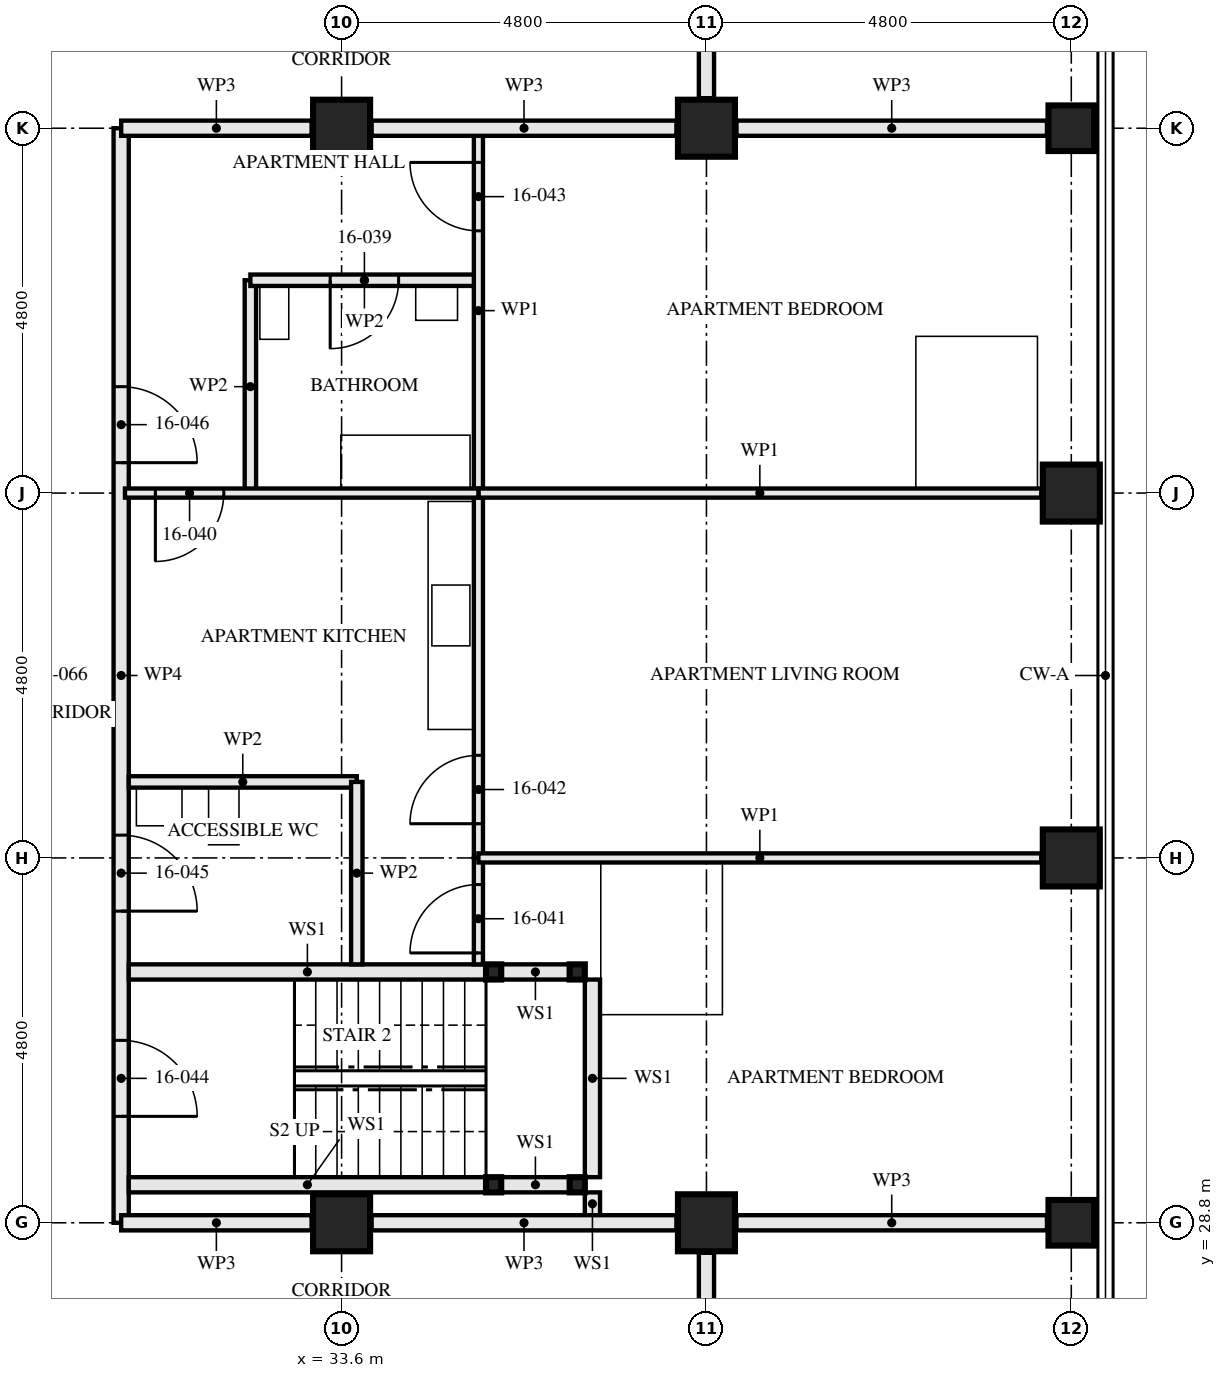
"""IFC4 building model, lengths in metres.
Left out: names, types, materials, properties, quantities, classifications, styles, units other than length and angle.
Written with IfcOpenShell. Run it as: python <this file> out.ifc"""

import sys

from ifc_helpers import new_model, si_unit, direction, frame, frame_2d, origin, origin_2d, place, context, subcontext, project, spatial, rectangle, hollow_rectangle, extrude, element, fill, save


model = new_model("IFC4")
c1 = context("Model", 3, precision=1e-05, world=origin(), true_north=direction((0.0, 1.0)))
c2 = subcontext(c1, "Body", "Model", "MODEL_VIEW")
j1 = project(units=[si_unit("LENGTHUNIT", "METRE"), si_unit("PLANEANGLEUNIT", "RADIAN")], contexts=[c1])
p1 = place(None, origin())
s1 = spatial("IfcSite", under=j1, at=p1, CompositionType="ELEMENT")
p2 = place(p1, origin())
s2 = spatial("IfcBuilding", under=s1, at=p2, CompositionType="ELEMENT")
p3 = place(p2, frame((0.0, 0.0, 62.0)))
s3 = spatial("IfcBuildingStorey", under=s2, at=p3, CompositionType="ELEMENT", Elevation=62.0)
for number, where, z_axis, x_axis in (
    (1, (33.6, 28.8, 0.0), (0.0, 0.0, 1.0), (0.0, 1.0, 0.0)),
    (2, (33.6, 43.2, 0.0), (0.0, 0.0, 1.0), (0.0, 1.0, 0.0)),
    (3, (38.4, 28.8, 0.0), (0.0, 0.0, 1.0), (0.0, 1.0, 0.0)),
    (4, (38.4, 43.2, 0.0), (0.0, 0.0, 1.0), (0.0, 1.0, 0.0)),
):
    element("IfcColumn", number, at=place(p3, frame(where, z_axis=z_axis, x_axis=x_axis)), inside=s3, PredefinedType="COLUMN", context=c2, shape_type="SweptSolid", body=[
        extrude(hollow_rectangle(XDim=0.75, YDim=0.75, WallThickness=0.08, at=origin_2d()), origin(), (0.0, 0.0, 1.0), 3.5),
    ])
p4 = place(p3, frame((43.2, 28.8, 0.0), z_axis=(0.0, 0.0, 1.0), x_axis=(0.0, 1.0, 0.0)))
e5 = element("IfcColumn", 5, at=p4, inside=s3, PredefinedType="COLUMN", context=c2, shape_type="SweptSolid", body=[
    extrude(hollow_rectangle(XDim=0.6, YDim=0.6, WallThickness=0.08, at=origin_2d()), origin(), (0.0, 0.0, 1.0), 3.5),
])
for number, where, z_axis, x_axis in (
    (6, (43.2, 33.6, 0.0), (0.0, 0.0, 1.0), (1.0, 0.0, 0.0)),
    (7, (43.2, 38.4, 0.0), (0.0, 0.0, 1.0), (1.0, 0.0, 0.0)),
):
    element("IfcColumn", number, at=place(p3, frame(where, z_axis=z_axis, x_axis=x_axis)), inside=s3, PredefinedType="COLUMN", context=c2, shape_type="SweptSolid", body=[
        extrude(hollow_rectangle(XDim=0.75, YDim=0.75, WallThickness=0.08, at=origin_2d()), origin(), (0.0, 0.0, 1.0), 3.5),
    ])
p5 = place(p3, frame((43.2, 43.2, 0.0), z_axis=(0.0, 0.0, 1.0), x_axis=(0.0, 1.0, 0.0)))
e8 = element("IfcColumn", 8, at=p5, inside=s3, PredefinedType="COLUMN", context=c2, shape_type="SweptSolid", body=[
    extrude(hollow_rectangle(XDim=0.6, YDim=0.6, WallThickness=0.08, at=origin_2d()), origin(), (0.0, 0.0, 1.0), 3.5),
])
for number, where, z_axis, x_axis in (
    (9, (36.7, 29.3, 0.0), (0.0, 0.0, 1.0), (1.0, 0.0, 0.0)),
    (10, (36.7, 32.1, 0.0), (0.0, 0.0, 1.0), (1.0, 0.0, 0.0)),
    (11, (35.6, 29.3, 0.0), (0.0, 0.0, 1.0), (1.0, 0.0, 0.0)),
    (12, (35.6, 32.1, 0.0), (0.0, 0.0, 1.0), (1.0, 0.0, 0.0)),
):
    element("IfcColumn", number, at=place(p3, frame(where, z_axis=z_axis, x_axis=x_axis)), inside=s3, PredefinedType="COLUMN", context=c2, shape_type="SweptSolid", body=[
        extrude(hollow_rectangle(XDim=0.2, YDim=0.2, WallThickness=0.008, at=origin_2d()), origin(), (0.0, 0.0, 1.0), 3.33),
    ])
p6 = place(p3, frame((38.4, 26.8, 0.0), z_axis=(0.0, 0.0, 1.0), x_axis=(0.0, 1.0, 0.0)))
e13 = element("IfcWall", 13, at=p6, inside=s3, PredefinedType="PARTITIONING", context=c2, shape_type="SweptSolid", body=[
    extrude(rectangle(XDim=1.605, YDim=0.2, at=frame_2d((0.802, 0.0))), origin(), (0.0, 0.0, 1.0), 3.33),
])
p7 = place(p3, frame((36.6, 29.3, 0.0), z_axis=(0.0, 0.0, 1.0), x_axis=(-1.0, 0.0, 0.0)))
e14 = element("IfcWall", 14, at=p7, inside=s3, PredefinedType="SOLIDWALL", context=c2, shape_type="SweptSolid", body=[
    extrude(rectangle(XDim=0.9, YDim=0.2, at=frame_2d((0.45, 0.0))), origin(), (0.0, 0.0, 1.0), 2.99),
])
p8 = place(p3, frame((35.5, 29.3, 0.0), z_axis=(0.0, 0.0, 1.0), x_axis=(-1.0, 0.0, 0.0)))
e15 = element("IfcWall", 15, at=p8, inside=s3, PredefinedType="SOLIDWALL", context=c2, shape_type="SweptSolid", body=[
    extrude(rectangle(XDim=4.7, YDim=0.2, at=frame_2d((2.35, 0.0))), origin(), (0.0, 0.0, 1.0), 2.99),
])
p9 = place(p3, frame((36.6, 32.1, 0.0), z_axis=(0.0, 0.0, 1.0), x_axis=(-1.0, 0.0, 0.0)))
e16 = element("IfcWall", 16, at=p9, inside=s3, PredefinedType="SOLIDWALL", context=c2, shape_type="SweptSolid", body=[
    extrude(rectangle(XDim=0.9, YDim=0.2, at=frame_2d((0.45, 0.0))), origin(), (0.0, 0.0, 1.0), 2.99),
])
p10 = place(p3, frame((35.5, 32.1, 0.0), z_axis=(0.0, 0.0, 1.0), x_axis=(-1.0, 0.0, 0.0)))
e17 = element("IfcWall", 17, at=p10, inside=s3, PredefinedType="SOLIDWALL", context=c2, shape_type="SweptSolid", body=[
    extrude(rectangle(XDim=4.7, YDim=0.2, at=frame_2d((2.35, 0.0))), origin(), (0.0, 0.0, 1.0), 2.99),
])
p11 = place(p3, frame((36.9, 28.9, 0.0), z_axis=(0.0, 0.0, 1.0), x_axis=(0.0, 1.0, 0.0)))
e18 = element("IfcWall", 18, at=p11, inside=s3, PredefinedType="SOLIDWALL", context=c2, shape_type="SweptSolid", body=[
    extrude(rectangle(XDim=0.3, YDim=0.2, at=frame_2d((0.15, 0.0))), origin(), (0.0, 0.0, 1.0), 3.33),
])
p12 = place(p3, frame((36.9, 29.4, 0.0), z_axis=(0.0, 0.0, 1.0), x_axis=(0.0, 1.0, 0.0)))
e19 = element("IfcWall", 19, at=p12, inside=s3, PredefinedType="SOLIDWALL", context=c2, shape_type="SweptSolid", body=[
    extrude(rectangle(XDim=2.6, YDim=0.2, at=frame_2d((1.3, 0.0))), origin(), (0.0, 0.0, 1.0), 3.33),
])
p13 = place(p3, frame((33.8, 32.2, 0.0), z_axis=(0.0, 0.0, 1.0), x_axis=(0.0, 1.0, 0.0)))
e20 = element("IfcWall", 20, at=p13, inside=s3, PredefinedType="PARTITIONING", context=c2, shape_type="SweptSolid", body=[
    extrude(rectangle(XDim=2.4, YDim=0.15, at=frame_2d((1.2, 0.0))), origin(), (0.0, 0.0, 1.0), 2.55),
])
p14 = place(p3, frame((33.8, 34.6, 0.0), z_axis=(0.0, 0.0, 1.0), x_axis=(-1.0, 0.0, 0.0)))
e21 = element("IfcWall", 21, at=p14, inside=s3, PredefinedType="PARTITIONING", context=c2, shape_type="SweptSolid", body=[
    extrude(rectangle(XDim=3.0, YDim=0.15, at=frame_2d((1.5, 0.0))), origin(), (0.0, 0.0, 1.0), 3.33),
])
p15 = place(p3, frame((35.4, 41.2, 0.0), z_axis=(0.0, 0.0, 1.0), x_axis=(-1.0, 0.0, 0.0)))
e22 = element("IfcWall", 22, at=p15, inside=s3, PredefinedType="PARTITIONING", context=c2, shape_type="SweptSolid", body=[
    extrude(rectangle(XDim=3.0, YDim=0.15, at=frame_2d((1.5, 0.0))), origin(), (0.0, 0.0, 1.0), 3.33),
])
p16 = place(p15, frame((1.05, 0.0, 0.0)))
e23 = element("IfcOpeningElement", 23, at=p16, cuts=e22, PredefinedType="OPENING", context=c2, shape_type="SweptSolid", body=[
    extrude(rectangle(XDim=0.9, YDim=2.1, at=frame_2d((0.45, 1.05))), frame((0.0, 0.085, 0.0), z_axis=(0.0, -1.0, 0.0), x_axis=(1.0, 0.0, 0.0)), (0.0, 0.0, 1.0), 0.171),
])
p17 = place(p3, frame((32.4, 38.4, 0.0), z_axis=(0.0, 0.0, 1.0), x_axis=(0.0, 1.0, 0.0)))
e24 = element("IfcWall", 24, at=p17, inside=s3, PredefinedType="PARTITIONING", context=c2, shape_type="SweptSolid", body=[
    extrude(rectangle(XDim=2.8, YDim=0.15, at=frame_2d((1.4, 0.0))), origin(), (0.0, 0.0, 1.0), 3.33),
])
p18 = place(p3, frame((35.4, 38.4, 0.0), z_axis=(0.0, 0.0, 1.0), x_axis=(-1.0, 0.0, 0.0)))
e25 = element("IfcWall", 25, at=p18, inside=s3, PredefinedType="PARTITIONING", context=c2, shape_type="SweptSolid", body=[
    extrude(rectangle(XDim=4.65, YDim=0.12, at=frame_2d((2.325, 0.0))), origin(), (0.0, 0.0, 1.0), 2.55),
])
p19 = place(p18, frame((3.35, 0.0, 0.0)))
e26 = element("IfcOpeningElement", 26, at=p19, cuts=e25, PredefinedType="OPENING", context=c2, shape_type="SweptSolid", body=[
    extrude(rectangle(XDim=0.9, YDim=2.1, at=frame_2d((0.45, 1.05))), frame((0.0, 0.071, 0.0), z_axis=(0.0, -1.0, 0.0), x_axis=(1.0, 0.0, 0.0)), (0.0, 0.0, 1.0), 0.141),
])
p20 = place(p3, frame((35.4, 32.2, 0.0), z_axis=(0.0, 0.0, 1.0), x_axis=(0.0, 1.0, 0.0)))
e27 = element("IfcWall", 27, at=p20, inside=s3, PredefinedType="PARTITIONING", context=c2, shape_type="SweptSolid", body=[
    extrude(rectangle(XDim=1.4, YDim=0.12, at=frame_2d((0.7, 0.0))), origin(), (0.0, 0.0, 1.0), 3.33),
])
p21 = place(p20, frame((0.15, 0.0, 0.0)))
e28 = element("IfcOpeningElement", 28, at=p21, cuts=e27, PredefinedType="OPENING", context=c2, shape_type="SweptSolid", body=[
    extrude(rectangle(XDim=0.9, YDim=2.1, at=frame_2d((0.45, 1.05))), frame((0.0, 0.071, 0.0), z_axis=(0.0, -1.0, 0.0), x_axis=(1.0, 0.0, 0.0)), (0.0, 0.0, 1.0), 0.141),
])
p22 = place(p3, frame((35.4, 33.6, 0.0), z_axis=(0.0, 0.0, 1.0), x_axis=(0.0, 1.0, 0.0)))
e29 = element("IfcWall", 29, at=p22, inside=s3, PredefinedType="PARTITIONING", context=c2, shape_type="SweptSolid", body=[
    extrude(rectangle(XDim=4.8, YDim=0.12, at=frame_2d((2.4, 0.0))), origin(), (0.0, 0.0, 1.0), 3.33),
])
p23 = place(p22, frame((0.45, 0.0, 0.0)))
e30 = element("IfcOpeningElement", 30, at=p23, cuts=e29, PredefinedType="OPENING", context=c2, shape_type="SweptSolid", body=[
    extrude(rectangle(XDim=0.9, YDim=2.1, at=frame_2d((0.45, 1.05))), frame((0.0, 0.071, 0.0), z_axis=(0.0, -1.0, 0.0), x_axis=(1.0, 0.0, 0.0)), (0.0, 0.0, 1.0), 0.141),
])
p24 = place(p3, frame((35.4, 38.4, 0.0), z_axis=(0.0, 0.0, 1.0), x_axis=(0.0, 1.0, 0.0)))
e31 = element("IfcWall", 31, at=p24, inside=s3, PredefinedType="PARTITIONING", context=c2, shape_type="SweptSolid", body=[
    extrude(rectangle(XDim=4.8, YDim=0.12, at=frame_2d((2.4, 0.0))), origin(), (0.0, 0.0, 1.0), 3.33),
])
p25 = place(p24, frame((3.45, 0.0, 0.0)))
e32 = element("IfcOpeningElement", 32, at=p25, cuts=e31, PredefinedType="OPENING", context=c2, shape_type="SweptSolid", body=[
    extrude(rectangle(XDim=0.9, YDim=2.1, at=frame_2d((0.45, 1.05))), frame((0.0, 0.071, 0.0), z_axis=(0.0, -1.0, 0.0), x_axis=(1.0, 0.0, 0.0)), (0.0, 0.0, 1.0), 0.141),
])
for number, where, z_axis, x_axis in (
    (33, (42.805, 33.6, 0.0), (0.0, 0.0, 1.0), (-1.0, 0.0, 0.0)),
    (34, (42.805, 38.4, 0.0), (0.0, 0.0, 1.0), (-1.0, 0.0, 0.0)),
):
    element("IfcWall", number, at=place(p3, frame(where, z_axis=z_axis, x_axis=x_axis)), inside=s3, PredefinedType="PARTITIONING", context=c2, shape_type="SweptSolid", body=[
        extrude(rectangle(XDim=7.405, YDim=0.12, at=frame_2d((3.703, 0.0))), origin(), (0.0, 0.0, 1.0), 2.55),
    ])
p26 = place(p3, frame((30.7, 28.8, 0.0), z_axis=(0.0, 0.0, 1.0), x_axis=(0.0, 1.0, 0.0)))
e35 = element("IfcWall", 35, at=p26, inside=s3, PredefinedType="PARTITIONING", context=c2, shape_type="SweptSolid", body=[
    extrude(rectangle(XDim=14.4, YDim=0.2, at=frame_2d((7.2, 0.0))), origin(), (0.0, 0.0, 1.0), 2.55),
])
p27 = place(p26, frame((1.4, 0.0, 0.0)))
e36 = element("IfcOpeningElement", 36, at=p27, cuts=e35, PredefinedType="OPENING", context=c2, shape_type="SweptSolid", body=[
    extrude(rectangle(XDim=1.0, YDim=2.1, at=frame_2d((0.5, 1.05))), frame((0.0, 0.111, 0.0), z_axis=(0.0, -1.0, 0.0), x_axis=(1.0, 0.0, 0.0)), (0.0, 0.0, 1.0), 0.221),
])
p28 = place(p26, frame((4.1, 0.0, 0.0)))
e37 = element("IfcOpeningElement", 37, at=p28, cuts=e35, PredefinedType="OPENING", context=c2, shape_type="SweptSolid", body=[
    extrude(rectangle(XDim=1.0, YDim=2.1, at=frame_2d((0.5, 1.05))), frame((0.0, 0.111, 0.0), z_axis=(0.0, -1.0, 0.0), x_axis=(1.0, 0.0, 0.0)), (0.0, 0.0, 1.0), 0.221),
])
p29 = place(p26, frame((10.0, 0.0, 0.0)))
e38 = element("IfcOpeningElement", 38, at=p29, cuts=e35, PredefinedType="OPENING", context=c2, shape_type="SweptSolid", body=[
    extrude(rectangle(XDim=1.0, YDim=2.1, at=frame_2d((0.5, 1.05))), frame((0.0, 0.111, 0.0), z_axis=(0.0, -1.0, 0.0), x_axis=(1.0, 0.0, 0.0)), (0.0, 0.0, 1.0), 0.221),
])
p30 = place(p3, frame((38.4, 45.2, 0.0), z_axis=(0.0, 0.0, 1.0), x_axis=(0.0, -1.0, 0.0)))
e39 = element("IfcWall", 39, at=p30, inside=s3, PredefinedType="PARTITIONING", context=c2, shape_type="SweptSolid", body=[
    extrude(rectangle(XDim=1.605, YDim=0.2, at=frame_2d((0.802, 0.0))), origin(), (0.0, 0.0, 1.0), 3.33),
])
p31 = place(p3, frame((42.88, 28.8, 0.0), z_axis=(0.0, 0.0, 1.0), x_axis=(-1.0, 0.0, 0.0)))
e40 = element("IfcWall", 40, at=p31, inside=s3, PredefinedType="PARTITIONING", context=c2, shape_type="SweptSolid", body=[
    extrude(rectangle(XDim=4.085, YDim=0.2, at=frame_2d((2.042, 0.0))), origin(), (0.0, 0.0, 1.0), 2.32),
])
p32 = place(p3, frame((38.005, 28.8, 0.0), z_axis=(0.0, 0.0, 1.0), x_axis=(-1.0, 0.0, 0.0)))
e41 = element("IfcWall", 41, at=p32, inside=s3, PredefinedType="PARTITIONING", context=c2, shape_type="SweptSolid", body=[
    extrude(rectangle(XDim=4.01, YDim=0.2, at=frame_2d((2.005, 0.0))), origin(), (0.0, 0.0, 1.0), 2.32),
])
p33 = place(p3, frame((33.205, 28.8, 0.0), z_axis=(0.0, 0.0, 1.0), x_axis=(-1.0, 0.0, 0.0)))
e42 = element("IfcWall", 42, at=p33, inside=s3, PredefinedType="PARTITIONING", context=c2, shape_type="SweptSolid", body=[
    extrude(rectangle(XDim=2.505, YDim=0.2, at=frame_2d((1.252, 0.0))), origin(), (0.0, 0.0, 1.0), 2.32),
])
p34 = place(p3, frame((42.88, 43.2, 0.0), z_axis=(0.0, 0.0, 1.0), x_axis=(-1.0, 0.0, 0.0)))
e43 = element("IfcWall", 43, at=p34, inside=s3, PredefinedType="PARTITIONING", context=c2, shape_type="SweptSolid", body=[
    extrude(rectangle(XDim=4.085, YDim=0.2, at=frame_2d((2.042, 0.0))), origin(), (0.0, 0.0, 1.0), 2.32),
])
p35 = place(p3, frame((38.005, 43.2, 0.0), z_axis=(0.0, 0.0, 1.0), x_axis=(-1.0, 0.0, 0.0)))
e44 = element("IfcWall", 44, at=p35, inside=s3, PredefinedType="PARTITIONING", context=c2, shape_type="SweptSolid", body=[
    extrude(rectangle(XDim=4.01, YDim=0.2, at=frame_2d((2.005, 0.0))), origin(), (0.0, 0.0, 1.0), 2.32),
])
p36 = place(p3, frame((33.205, 43.2, 0.0), z_axis=(0.0, 0.0, 1.0), x_axis=(-1.0, 0.0, 0.0)))
e45 = element("IfcWall", 45, at=p36, inside=s3, PredefinedType="PARTITIONING", context=c2, shape_type="SweptSolid", body=[
    extrude(rectangle(XDim=2.505, YDim=0.2, at=frame_2d((1.252, 0.0))), origin(), (0.0, 0.0, 1.0), 2.32),
])
p37 = place(p16, origin())
e46 = element("IfcDoor", 46, at=p37, inside=s3, OperationType="SINGLE_SWING_LEFT", PredefinedType="DOOR", context=c2, shape_type="SweptSolid", body=[
    extrude(rectangle(XDim=0.9, YDim=2.1, at=frame_2d((0.45, 1.05))), frame((0.0, 0.022, 0.0), z_axis=(0.0, -1.0, 0.0), x_axis=(1.0, 0.0, 0.0)), (0.0, 0.0, 1.0), 0.044),
])
fill(e23, e46)
p38 = place(p19, origin())
e47 = element("IfcDoor", 47, at=p38, inside=s3, OperationType="SINGLE_SWING_LEFT", PredefinedType="DOOR", context=c2, shape_type="SweptSolid", body=[
    extrude(rectangle(XDim=0.9, YDim=2.1, at=frame_2d((0.45, 1.05))), frame((0.0, 0.022, 0.0), z_axis=(0.0, -1.0, 0.0), x_axis=(1.0, 0.0, 0.0)), (0.0, 0.0, 1.0), 0.044),
])
fill(e26, e47)
p39 = place(p21, origin())
e48 = element("IfcDoor", 48, at=p39, inside=s3, OperationType="SINGLE_SWING_RIGHT", PredefinedType="DOOR", context=c2, shape_type="SweptSolid", body=[
    extrude(rectangle(XDim=0.9, YDim=2.1, at=frame_2d((0.45, 1.05))), frame((0.0, 0.022, 0.0), z_axis=(0.0, -1.0, 0.0), x_axis=(1.0, 0.0, 0.0)), (0.0, 0.0, 1.0), 0.044),
])
fill(e28, e48)
p40 = place(p23, origin())
e49 = element("IfcDoor", 49, at=p40, inside=s3, OperationType="SINGLE_SWING_RIGHT", PredefinedType="DOOR", context=c2, shape_type="SweptSolid", body=[
    extrude(rectangle(XDim=0.9, YDim=2.1, at=frame_2d((0.45, 1.05))), frame((0.0, 0.022, 0.0), z_axis=(0.0, -1.0, 0.0), x_axis=(1.0, 0.0, 0.0)), (0.0, 0.0, 1.0), 0.044),
])
fill(e30, e49)
p41 = place(p25, origin())
e50 = element("IfcDoor", 50, at=p41, inside=s3, OperationType="SINGLE_SWING_LEFT", PredefinedType="DOOR", context=c2, shape_type="SweptSolid", body=[
    extrude(rectangle(XDim=0.9, YDim=2.1, at=frame_2d((0.45, 1.05))), frame((0.0, 0.022, 0.0), z_axis=(0.0, -1.0, 0.0), x_axis=(1.0, 0.0, 0.0)), (0.0, 0.0, 1.0), 0.044),
])
fill(e32, e50)
p42 = place(p27, frame((1.0, 0.0, 0.0), z_axis=(0.0, 0.0, 1.0), x_axis=(-1.0, 0.0, 0.0)))
e51 = element("IfcDoor", 51, at=p42, inside=s3, OperationType="SINGLE_SWING_LEFT", PredefinedType="DOOR", context=c2, shape_type="SweptSolid", body=[
    extrude(rectangle(XDim=1.0, YDim=2.1, at=frame_2d((0.5, 1.05))), frame((0.0, 0.032, 0.0), z_axis=(0.0, -1.0, 0.0), x_axis=(1.0, 0.0, 0.0)), (0.0, 0.0, 1.0), 0.064),
])
fill(e36, e51)
p43 = place(p28, frame((1.0, 0.0, 0.0), z_axis=(0.0, 0.0, 1.0), x_axis=(-1.0, 0.0, 0.0)))
e52 = element("IfcDoor", 52, at=p43, inside=s3, OperationType="SINGLE_SWING_LEFT", PredefinedType="DOOR", context=c2, shape_type="SweptSolid", body=[
    extrude(rectangle(XDim=1.0, YDim=2.1, at=frame_2d((0.5, 1.05))), frame((0.0, 0.027, 0.0), z_axis=(0.0, -1.0, 0.0), x_axis=(1.0, 0.0, 0.0)), (0.0, 0.0, 1.0), 0.054),
])
fill(e37, e52)
p44 = place(p29, frame((1.0, 0.0, 0.0), z_axis=(0.0, 0.0, 1.0), x_axis=(-1.0, 0.0, 0.0)))
e53 = element("IfcDoor", 53, at=p44, inside=s3, OperationType="SINGLE_SWING_LEFT", PredefinedType="DOOR", context=c2, shape_type="SweptSolid", body=[
    extrude(rectangle(XDim=1.0, YDim=2.1, at=frame_2d((0.5, 1.05))), frame((0.0, 0.027, 0.0), z_axis=(0.0, -1.0, 0.0), x_axis=(1.0, 0.0, 0.0)), (0.0, 0.0, 1.0), 0.054),
])
fill(e38, e53)
save(model, sys.argv[1])
